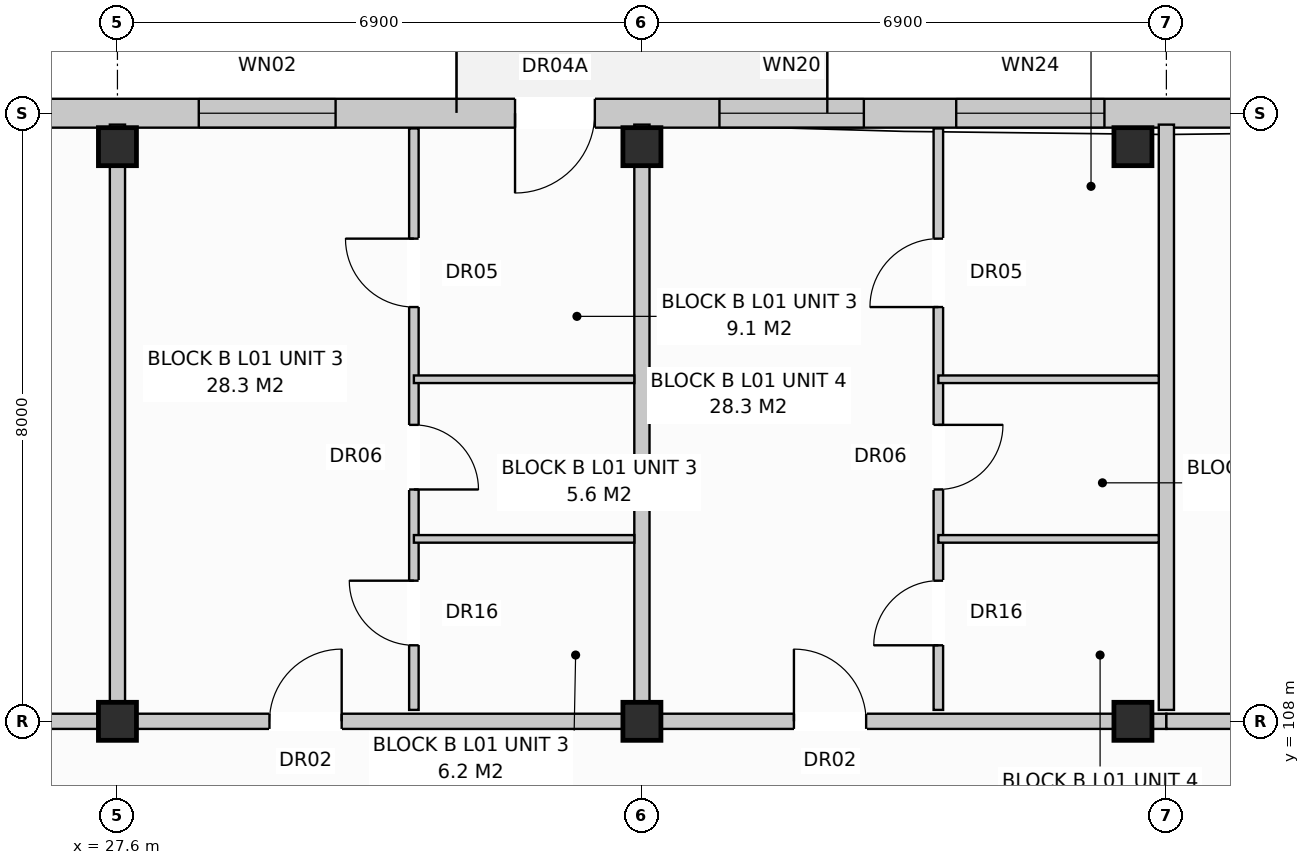
"""IFC4 building model, lengths in metres.
Left out: names, types, materials, properties, quantities, classifications, styles, units other than length and angle.
Written with IfcOpenShell. Run it as: python <this file> out.ifc"""

import sys

from ifc_helpers import new_model, si_unit, direction, frame, frame_2d, origin, origin_with_axes, origin_2d, place, context, subcontext, project, spatial, rectangle, extrude, element, fill, save


model = new_model("IFC4")
c1 = context("Model", 3, precision=1e-05, world=origin(), true_north=direction((0.0, 1.0)))
c2 = subcontext(c1, "Body", "Model", "MODEL_VIEW")
j1 = project(units=[si_unit("LENGTHUNIT", "METRE"), si_unit("PLANEANGLEUNIT", "RADIAN")], contexts=[c1])
p1 = place(None, origin())
s1 = spatial("IfcSite", under=j1, at=p1, CompositionType="ELEMENT")
p2 = place(p1, origin())
s2 = spatial("IfcBuilding", under=s1, at=p2, CompositionType="ELEMENT")
p3 = place(p2, frame((0.0, 0.0, 4.4)))
s3 = spatial("IfcBuildingStorey", under=s2, at=p3, CompositionType="ELEMENT", Elevation=4.4)
for number, where, z_axis, x_axis in (
    (1, (27.6, 108.0, 0.0), (0.0, 0.0, 1.0), (1.0, 0.0, 0.0)),
    (2, (27.6, 115.56, 0.0), (0.0, 0.0, 1.0), (1.0, 0.0, 0.0)),
    (3, (34.5, 108.0, 0.0), (0.0, 0.0, 1.0), (1.0, 0.0, 0.0)),
    (4, (34.5, 115.56, 0.0), (0.0, 0.0, 1.0), (1.0, 0.0, 0.0)),
    (5, (40.96, 108.0, 0.0), (0.0, 0.0, 1.0), (1.0, 0.0, 0.0)),
    (6, (40.96, 115.56, 0.0), (0.0, 0.0, 1.0), (1.0, 0.0, 0.0)),
):
    element("IfcColumn", number, at=place(p3, frame(where, z_axis=z_axis, x_axis=x_axis)), inside=s3, PredefinedType="COLUMN", context=c2, shape_type="SweptSolid", body=[
        extrude(rectangle(XDim=0.5, YDim=0.5, at=origin_2d()), origin(), (0.0, 0.0, 1.0), 3.6),
    ])
p4 = place(p3, frame((0.18, 116.0, 0.0), z_axis=(0.0, 0.0, 1.0), x_axis=(1.0, 0.0, 0.0)))
e7 = element("IfcWall", 7, at=p4, inside=s3, PredefinedType="STANDARD", context=c2, shape_type="SweptSolid", body=[
    extrude(rectangle(XDim=54.84, YDim=0.38, at=frame_2d((27.42, 0.0))), origin(), (0.0, 0.0, 1.0), 3.33),
])
p5 = place(p4, frame((7.34, 0.0, 0.0)))
e8 = element("IfcOpeningElement", 8, at=p5, cuts=e7, PredefinedType="OPENING", context=c2, shape_type="SweptSolid", body=[
    extrude(rectangle(XDim=1.05, YDim=2.12, at=frame_2d((0.525, 1.06))), frame((0.0, 0.202, 0.0), z_axis=(0.0, -1.0, 0.0), x_axis=(1.0, 0.0, 0.0)), (0.0, 0.0, 1.0), 0.404),
])
p6 = place(p4, frame((18.851, 0.0, 0.0)))
e9 = element("IfcOpeningElement", 9, at=p6, cuts=e7, PredefinedType="OPENING", context=c2, shape_type="SweptSolid", body=[
    extrude(rectangle(XDim=1.05, YDim=2.12, at=frame_2d((0.525, 1.06))), frame((0.0, 0.202, 0.0), z_axis=(0.0, -1.0, 0.0), x_axis=(1.0, 0.0, 0.0)), (0.0, 0.0, 1.0), 0.404),
])
p7 = place(p4, frame((32.651, 0.0, 0.0)))
e10 = element("IfcOpeningElement", 10, at=p7, cuts=e7, PredefinedType="OPENING", context=c2, shape_type="SweptSolid", body=[
    extrude(rectangle(XDim=1.05, YDim=2.12, at=frame_2d((0.525, 1.06))), frame((0.0, 0.202, 0.0), z_axis=(0.0, -1.0, 0.0), x_axis=(1.0, 0.0, 0.0)), (0.0, 0.0, 1.0), 0.404),
])
p8 = place(p4, frame((48.74, 0.0, 0.0)))
e11 = element("IfcOpeningElement", 11, at=p8, cuts=e7, PredefinedType="OPENING", context=c2, shape_type="SweptSolid", body=[
    extrude(rectangle(XDim=1.05, YDim=2.12, at=frame_2d((0.525, 1.06))), frame((0.0, 0.202, 0.0), z_axis=(0.0, -1.0, 0.0), x_axis=(1.0, 0.0, 0.0)), (0.0, 0.0, 1.0), 0.404),
])
p9 = place(p4, frame((1.54, 0.0, 0.8)))
e12 = element("IfcOpeningElement", 12, at=p9, cuts=e7, PredefinedType="OPENING", context=c2, shape_type="SweptSolid", body=[
    extrude(rectangle(XDim=1.9, YDim=1.85, at=frame_2d((0.95, 0.925))), frame((0.0, 0.202, 0.0), z_axis=(0.0, -1.0, 0.0), x_axis=(1.0, 0.0, 0.0)), (0.0, 0.0, 1.0), 0.404),
])
p10 = place(p4, frame((10.415, 0.0, 0.8)))
e13 = element("IfcOpeningElement", 13, at=p10, cuts=e7, PredefinedType="OPENING", context=c2, shape_type="SweptSolid", body=[
    extrude(rectangle(XDim=1.95, YDim=1.65, at=frame_2d((0.975, 0.825))), frame((0.0, 0.202, 0.0), z_axis=(0.0, -1.0, 0.0), x_axis=(1.0, 0.0, 0.0)), (0.0, 0.0, 1.0), 0.404),
])
p11 = place(p4, frame((14.89, 0.0, 0.8)))
e14 = element("IfcOpeningElement", 14, at=p11, cuts=e7, PredefinedType="OPENING", context=c2, shape_type="SweptSolid", body=[
    extrude(rectangle(XDim=1.8, YDim=1.7, at=frame_2d((0.9, 0.85))), frame((0.0, 0.202, 0.0), z_axis=(0.0, -1.0, 0.0), x_axis=(1.0, 0.0, 0.0)), (0.0, 0.0, 1.0), 0.404),
])
p12 = place(p4, frame((21.09, 0.0, 0.9)))
e15 = element("IfcOpeningElement", 15, at=p12, cuts=e7, PredefinedType="OPENING", context=c2, shape_type="SweptSolid", body=[
    extrude(rectangle(XDim=0.95, YDim=1.55, at=frame_2d((0.475, 0.775))), frame((0.0, 0.202, 0.0), z_axis=(0.0, -1.0, 0.0), x_axis=(1.0, 0.0, 0.0)), (0.0, 0.0, 1.0), 0.404),
])
p13 = place(p4, frame((23.815, 0.0, 0.8)))
e16 = element("IfcOpeningElement", 16, at=p13, cuts=e7, PredefinedType="OPENING", context=c2, shape_type="SweptSolid", body=[
    extrude(rectangle(XDim=1.95, YDim=1.65, at=frame_2d((0.975, 0.825))), frame((0.0, 0.202, 0.0), z_axis=(0.0, -1.0, 0.0), x_axis=(1.0, 0.0, 0.0)), (0.0, 0.0, 1.0), 0.404),
])
p14 = place(p4, frame((28.49, 0.0, 0.8)))
e17 = element("IfcOpeningElement", 17, at=p14, cuts=e7, PredefinedType="OPENING", context=c2, shape_type="SweptSolid", body=[
    extrude(rectangle(XDim=1.8, YDim=1.7, at=frame_2d((0.9, 0.85))), frame((0.0, 0.202, 0.0), z_axis=(0.0, -1.0, 0.0), x_axis=(1.0, 0.0, 0.0)), (0.0, 0.0, 1.0), 0.404),
])
p15 = place(p4, frame((35.34, 0.0, 0.8)))
e18 = element("IfcOpeningElement", 18, at=p15, cuts=e7, PredefinedType="OPENING", context=c2, shape_type="SweptSolid", body=[
    extrude(rectangle(XDim=1.9, YDim=1.85, at=frame_2d((0.95, 0.925))), frame((0.0, 0.202, 0.0), z_axis=(0.0, -1.0, 0.0), x_axis=(1.0, 0.0, 0.0)), (0.0, 0.0, 1.0), 0.404),
])
p16 = place(p4, frame((38.455, 0.0, 0.8)))
e19 = element("IfcOpeningElement", 19, at=p16, cuts=e7, PredefinedType="OPENING", context=c2, shape_type="SweptSolid", body=[
    extrude(rectangle(XDim=1.95, YDim=1.65, at=frame_2d((0.975, 0.825))), frame((0.0, 0.202, 0.0), z_axis=(0.0, -1.0, 0.0), x_axis=(1.0, 0.0, 0.0)), (0.0, 0.0, 1.0), 0.404),
])
p17 = place(p4, frame((42.99, 0.0, 0.8)))
e20 = element("IfcOpeningElement", 20, at=p17, cuts=e7, PredefinedType="OPENING", context=c2, shape_type="SweptSolid", body=[
    extrude(rectangle(XDim=1.8, YDim=1.7, at=frame_2d((0.9, 0.85))), frame((0.0, 0.202, 0.0), z_axis=(0.0, -1.0, 0.0), x_axis=(1.0, 0.0, 0.0)), (0.0, 0.0, 1.0), 0.404),
])
p18 = place(p4, frame((51.84, 0.0, 0.8)))
e21 = element("IfcOpeningElement", 21, at=p18, cuts=e7, PredefinedType="OPENING", context=c2, shape_type="SweptSolid", body=[
    extrude(rectangle(XDim=1.9, YDim=1.85, at=frame_2d((0.95, 0.925))), frame((0.0, 0.202, 0.0), z_axis=(0.0, -1.0, 0.0), x_axis=(1.0, 0.0, 0.0)), (0.0, 0.0, 1.0), 0.404),
])
p19 = place(p3, frame((27.6, 108.15, 0.0), z_axis=(0.0, 0.0, 1.0), x_axis=(0.0, 1.0, 0.0)))
e22 = element("IfcWall", 22, at=p19, inside=s3, PredefinedType="PARTITIONING", context=c2, shape_type="SweptSolid", body=[
    extrude(rectangle(XDim=7.7, YDim=0.2, at=frame_2d((3.85, 0.0))), origin(), (0.0, 0.0, 1.0), 3.33),
])
p20 = place(p3, frame((13.8, 108.0, 0.0), z_axis=(0.0, 0.0, 1.0), x_axis=(1.0, 0.0, 0.0)))
e23 = element("IfcWall", 23, at=p20, inside=s3, PredefinedType="PARTITIONING", context=c2, shape_type="SweptSolid", body=[
    extrude(rectangle(XDim=13.8, YDim=0.2, at=frame_2d((6.9, 0.0))), origin(), (0.0, 0.0, 1.0), 2.77),
])
p21 = place(p20, frame((9.6, 0.0, 0.0)))
e24 = element("IfcOpeningElement", 24, at=p21, cuts=e23, PredefinedType="OPENING", context=c2, shape_type="SweptSolid", body=[
    extrude(rectangle(XDim=0.95, YDim=2.15, at=frame_2d((0.475, 1.075))), frame((0.0, 0.112, 0.0), z_axis=(0.0, -1.0, 0.0), x_axis=(1.0, 0.0, 0.0)), (0.0, 0.0, 1.0), 0.224),
])
p22 = place(p3, frame((34.5, 108.15, 0.0), z_axis=(0.0, 0.0, 1.0), x_axis=(0.0, 1.0, 0.0)))
e25 = element("IfcWall", 25, at=p22, inside=s3, PredefinedType="PARTITIONING", context=c2, shape_type="SweptSolid", body=[
    extrude(rectangle(XDim=7.7, YDim=0.2, at=frame_2d((3.85, 0.0))), origin(), (0.0, 0.0, 1.0), 3.33),
])
p23 = place(p3, frame((27.6, 108.0, 0.0), z_axis=(0.0, 0.0, 1.0), x_axis=(1.0, 0.0, 0.0)))
e26 = element("IfcWall", 26, at=p23, inside=s3, PredefinedType="PARTITIONING", context=c2, shape_type="SweptSolid", body=[
    extrude(rectangle(XDim=6.9, YDim=0.2, at=frame_2d((3.45, 0.0))), origin(), (0.0, 0.0, 1.0), 2.77),
])
p24 = place(p23, frame((2.0, 0.0, 0.0)))
e27 = element("IfcOpeningElement", 27, at=p24, cuts=e26, PredefinedType="OPENING", context=c2, shape_type="SweptSolid", body=[
    extrude(rectangle(XDim=0.95, YDim=2.15, at=frame_2d((0.475, 1.075))), frame((0.0, 0.112, 0.0), z_axis=(0.0, -1.0, 0.0), x_axis=(1.0, 0.0, 0.0)), (0.0, 0.0, 1.0), 0.224),
])
p25 = place(p3, frame((31.5, 108.15, 0.0), z_axis=(0.0, 0.0, 1.0), x_axis=(0.0, 1.0, 0.0)))
e28 = element("IfcWall", 28, at=p25, inside=s3, PredefinedType="PARTITIONING", context=c2, shape_type="SweptSolid", body=[
    extrude(rectangle(XDim=7.65, YDim=0.125, at=frame_2d((3.825, 0.0))), origin(), (0.0, 0.0, 1.0), 3.33),
])
p26 = place(p25, frame((0.85, 0.0, 0.0)))
e29 = element("IfcOpeningElement", 29, at=p26, cuts=e28, PredefinedType="OPENING", context=c2, shape_type="SweptSolid", body=[
    extrude(rectangle(XDim=0.85, YDim=2.1, at=frame_2d((0.425, 1.05))), frame((0.0, 0.074, 0.0), z_axis=(0.0, -1.0, 0.0), x_axis=(1.0, 0.0, 0.0)), (0.0, 0.0, 1.0), 0.149),
])
p27 = place(p25, frame((2.9, 0.0, 0.0)))
e30 = element("IfcOpeningElement", 30, at=p27, cuts=e28, PredefinedType="OPENING", context=c2, shape_type="SweptSolid", body=[
    extrude(rectangle(XDim=0.85, YDim=2.05, at=frame_2d((0.425, 1.025))), frame((0.0, 0.074, 0.0), z_axis=(0.0, -1.0, 0.0), x_axis=(1.0, 0.0, 0.0)), (0.0, 0.0, 1.0), 0.149),
])
p28 = place(p25, frame((5.3, 0.0, 0.0)))
e31 = element("IfcOpeningElement", 31, at=p28, cuts=e28, PredefinedType="OPENING", context=c2, shape_type="SweptSolid", body=[
    extrude(rectangle(XDim=0.9, YDim=2.1, at=frame_2d((0.45, 1.05))), frame((0.0, 0.074, 0.0), z_axis=(0.0, -1.0, 0.0), x_axis=(1.0, 0.0, 0.0)), (0.0, 0.0, 1.0), 0.149),
])
for number, where, z_axis, x_axis in (
    (32, (31.5, 110.4, 0.0), (0.0, 0.0, 1.0), (1.0, 0.0, 0.0)),
    (33, (31.5, 112.5, 0.0), (0.0, 0.0, 1.0), (1.0, 0.0, 0.0)),
):
    element("IfcWall", number, at=place(p3, frame(where, z_axis=z_axis, x_axis=x_axis)), inside=s3, PredefinedType="PARTITIONING", context=c2, shape_type="SweptSolid", body=[
        extrude(rectangle(XDim=2.9, YDim=0.1, at=frame_2d((1.45, 0.0))), origin(), (0.0, 0.0, 1.0), 3.33),
    ])
p29 = place(p3, frame((41.4, 108.15, 0.0), z_axis=(0.0, 0.0, 1.0), x_axis=(0.0, 1.0, 0.0)))
e34 = element("IfcWall", 34, at=p29, inside=s3, PredefinedType="PARTITIONING", context=c2, shape_type="SweptSolid", body=[
    extrude(rectangle(XDim=7.7, YDim=0.2, at=frame_2d((3.85, 0.0))), origin(), (0.0, 0.0, 1.0), 3.33),
])
p30 = place(p3, frame((34.5, 108.0, 0.0), z_axis=(0.0, 0.0, 1.0), x_axis=(1.0, 0.0, 0.0)))
e35 = element("IfcWall", 35, at=p30, inside=s3, PredefinedType="PARTITIONING", context=c2, shape_type="SweptSolid", body=[
    extrude(rectangle(XDim=6.9, YDim=0.2, at=frame_2d((3.45, 0.0))), origin(), (0.0, 0.0, 1.0), 2.77),
])
p31 = place(p30, frame((2.0, 0.0, 0.0)))
e36 = element("IfcOpeningElement", 36, at=p31, cuts=e35, PredefinedType="OPENING", context=c2, shape_type="SweptSolid", body=[
    extrude(rectangle(XDim=0.95, YDim=2.15, at=frame_2d((0.475, 1.075))), frame((0.0, 0.112, 0.0), z_axis=(0.0, -1.0, 0.0), x_axis=(1.0, 0.0, 0.0)), (0.0, 0.0, 1.0), 0.224),
])
p32 = place(p3, frame((38.4, 108.15, 0.0), z_axis=(0.0, 0.0, 1.0), x_axis=(0.0, 1.0, 0.0)))
e37 = element("IfcWall", 37, at=p32, inside=s3, PredefinedType="PARTITIONING", context=c2, shape_type="SweptSolid", body=[
    extrude(rectangle(XDim=7.65, YDim=0.125, at=frame_2d((3.825, 0.0))), origin(), (0.0, 0.0, 1.0), 2.99),
])
p33 = place(p32, frame((0.85, 0.0, 0.0)))
e38 = element("IfcOpeningElement", 38, at=p33, cuts=e37, PredefinedType="OPENING", context=c2, shape_type="SweptSolid", body=[
    extrude(rectangle(XDim=0.85, YDim=2.1, at=frame_2d((0.425, 1.05))), frame((0.0, 0.074, 0.0), z_axis=(0.0, -1.0, 0.0), x_axis=(1.0, 0.0, 0.0)), (0.0, 0.0, 1.0), 0.149),
])
p34 = place(p32, frame((2.9, 0.0, 0.0)))
e39 = element("IfcOpeningElement", 39, at=p34, cuts=e37, PredefinedType="OPENING", context=c2, shape_type="SweptSolid", body=[
    extrude(rectangle(XDim=0.85, YDim=2.05, at=frame_2d((0.425, 1.025))), frame((0.0, 0.074, 0.0), z_axis=(0.0, -1.0, 0.0), x_axis=(1.0, 0.0, 0.0)), (0.0, 0.0, 1.0), 0.149),
])
p35 = place(p32, frame((5.3, 0.0, 0.0)))
e40 = element("IfcOpeningElement", 40, at=p35, cuts=e37, PredefinedType="OPENING", context=c2, shape_type="SweptSolid", body=[
    extrude(rectangle(XDim=0.9, YDim=2.1, at=frame_2d((0.45, 1.05))), frame((0.0, 0.074, 0.0), z_axis=(0.0, -1.0, 0.0), x_axis=(1.0, 0.0, 0.0)), (0.0, 0.0, 1.0), 0.149),
])
for number, where, z_axis, x_axis in (
    (41, (38.4, 110.4, 0.0), (0.0, 0.0, 1.0), (1.0, 0.0, 0.0)),
    (42, (38.4, 112.5, 0.0), (0.0, 0.0, 1.0), (1.0, 0.0, 0.0)),
):
    element("IfcWall", number, at=place(p3, frame(where, z_axis=z_axis, x_axis=x_axis)), inside=s3, PredefinedType="PARTITIONING", context=c2, shape_type="SweptSolid", body=[
        extrude(rectangle(XDim=2.9, YDim=0.1, at=frame_2d((1.45, 0.0))), origin(), (0.0, 0.0, 1.0), 3.33),
    ])
p36 = place(p3, frame((41.4, 108.0, 0.0), z_axis=(0.0, 0.0, 1.0), x_axis=(1.0, 0.0, 0.0)))
e43 = element("IfcWall", 43, at=p36, inside=s3, PredefinedType="PARTITIONING", context=c2, shape_type="SweptSolid", body=[
    extrude(rectangle(XDim=13.8, YDim=0.2, at=frame_2d((6.9, 0.0))), origin(), (0.0, 0.0, 1.0), 2.77),
])
p37 = place(p36, frame((2.4, 0.0, 0.0)))
e44 = element("IfcOpeningElement", 44, at=p37, cuts=e43, PredefinedType="OPENING", context=c2, shape_type="SweptSolid", body=[
    extrude(rectangle(XDim=0.95, YDim=2.15, at=frame_2d((0.475, 1.075))), frame((0.0, 0.112, 0.0), z_axis=(0.0, -1.0, 0.0), x_axis=(1.0, 0.0, 0.0)), (0.0, 0.0, 1.0), 0.224),
])
p38 = place(p7, frame((1.05, 0.0, 0.0), z_axis=(0.0, 0.0, 1.0), x_axis=(-1.0, 0.0, 0.0)))
e45 = element("IfcDoor", 45, at=p38, inside=s3, OperationType="SINGLE_SWING_LEFT", PredefinedType="DOOR", context=c2, shape_type="SweptSolid", body=[
    extrude(rectangle(XDim=1.05, YDim=2.12, at=frame_2d((0.525, 1.06))), frame((0.0, 0.025, 0.0), z_axis=(0.0, -1.0, 0.0), x_axis=(1.0, 0.0, 0.0)), (0.0, 0.0, 1.0), 0.05),
])
fill(e10, e45)
p39 = place(p14, origin_with_axes())
e46 = element("IfcWindow", 46, at=p39, inside=s3, PartitioningType="SINGLE_PANEL", PredefinedType="WINDOW", context=c2, shape_type="SweptSolid", body=[
    extrude(rectangle(XDim=1.8, YDim=1.7, at=frame_2d((0.9, 0.85))), frame((0.0, 0.03, 0.0), z_axis=(0.0, -1.0, 0.0), x_axis=(1.0, 0.0, 0.0)), (0.0, 0.0, 1.0), 0.06),
])
fill(e17, e46)
p40 = place(p15, origin_with_axes())
e47 = element("IfcWindow", 47, at=p40, inside=s3, PartitioningType="SINGLE_PANEL", PredefinedType="WINDOW", context=c2, shape_type="SweptSolid", body=[
    extrude(rectangle(XDim=1.9, YDim=1.85, at=frame_2d((0.95, 0.925))), frame((0.0, 0.03, 0.0), z_axis=(0.0, -1.0, 0.0), x_axis=(1.0, 0.0, 0.0)), (0.0, 0.0, 1.0), 0.06),
])
fill(e18, e47)
p41 = place(p16, origin_with_axes())
e48 = element("IfcWindow", 48, at=p41, inside=s3, PartitioningType="SINGLE_PANEL", PredefinedType="WINDOW", context=c2, shape_type="SweptSolid", body=[
    extrude(rectangle(XDim=1.95, YDim=1.65, at=frame_2d((0.975, 0.825))), frame((0.0, 0.03, 0.0), z_axis=(0.0, -1.0, 0.0), x_axis=(1.0, 0.0, 0.0)), (0.0, 0.0, 1.0), 0.06),
])
fill(e19, e48)
p42 = place(p24, origin_with_axes())
e49 = element("IfcDoor", 49, at=p42, inside=s3, OperationType="SINGLE_SWING_RIGHT", PredefinedType="DOOR", context=c2, shape_type="SweptSolid", body=[
    extrude(rectangle(XDim=0.95, YDim=2.15, at=frame_2d((0.475, 1.075))), frame((0.0, 0.025, 0.0), z_axis=(0.0, -1.0, 0.0), x_axis=(1.0, 0.0, 0.0)), (0.0, 0.0, 1.0), 0.05),
])
fill(e27, e49)
p43 = place(p26, origin_with_axes())
e50 = element("IfcDoor", 50, at=p43, inside=s3, OperationType="SINGLE_SWING_RIGHT", PredefinedType="DOOR", context=c2, shape_type="SweptSolid", body=[
    extrude(rectangle(XDim=0.85, YDim=2.1, at=frame_2d((0.425, 1.05))), frame((0.0, 0.025, 0.0), z_axis=(0.0, -1.0, 0.0), x_axis=(1.0, 0.0, 0.0)), (0.0, 0.0, 1.0), 0.05),
])
fill(e29, e50)
p44 = place(p27, frame((0.85, 0.0, 0.0), z_axis=(0.0, 0.0, 1.0), x_axis=(-1.0, 0.0, 0.0)))
e51 = element("IfcDoor", 51, at=p44, inside=s3, OperationType="SINGLE_SWING_LEFT", PredefinedType="DOOR", context=c2, shape_type="SweptSolid", body=[
    extrude(rectangle(XDim=0.85, YDim=2.05, at=frame_2d((0.425, 1.025))), frame((0.0, 0.025, 0.0), z_axis=(0.0, -1.0, 0.0), x_axis=(1.0, 0.0, 0.0)), (0.0, 0.0, 1.0), 0.05),
])
fill(e30, e51)
p45 = place(p28, origin_with_axes())
e52 = element("IfcDoor", 52, at=p45, inside=s3, OperationType="SINGLE_SWING_RIGHT", PredefinedType="DOOR", context=c2, shape_type="SweptSolid", body=[
    extrude(rectangle(XDim=0.9, YDim=2.1, at=frame_2d((0.45, 1.05))), frame((0.0, 0.025, 0.0), z_axis=(0.0, -1.0, 0.0), x_axis=(1.0, 0.0, 0.0)), (0.0, 0.0, 1.0), 0.05),
])
fill(e31, e52)
p46 = place(p31, origin_with_axes())
e53 = element("IfcDoor", 53, at=p46, inside=s3, OperationType="SINGLE_SWING_LEFT", PredefinedType="DOOR", context=c2, shape_type="SweptSolid", body=[
    extrude(rectangle(XDim=0.95, YDim=2.15, at=frame_2d((0.475, 1.075))), frame((0.0, 0.025, 0.0), z_axis=(0.0, -1.0, 0.0), x_axis=(1.0, 0.0, 0.0)), (0.0, 0.0, 1.0), 0.05),
])
fill(e36, e53)
p47 = place(p33, origin_with_axes())
e54 = element("IfcDoor", 54, at=p47, inside=s3, OperationType="SINGLE_SWING_LEFT", PredefinedType="DOOR", context=c2, shape_type="SweptSolid", body=[
    extrude(rectangle(XDim=0.85, YDim=2.1, at=frame_2d((0.425, 1.05))), frame((0.0, 0.025, 0.0), z_axis=(0.0, -1.0, 0.0), x_axis=(1.0, 0.0, 0.0)), (0.0, 0.0, 1.0), 0.05),
])
fill(e38, e54)
p48 = place(p34, frame((0.85, 0.0, 0.0), z_axis=(0.0, 0.0, 1.0), x_axis=(-1.0, 0.0, 0.0)))
e55 = element("IfcDoor", 55, at=p48, inside=s3, OperationType="SINGLE_SWING_RIGHT", PredefinedType="DOOR", context=c2, shape_type="SweptSolid", body=[
    extrude(rectangle(XDim=0.85, YDim=2.05, at=frame_2d((0.425, 1.025))), frame((0.0, 0.025, 0.0), z_axis=(0.0, -1.0, 0.0), x_axis=(1.0, 0.0, 0.0)), (0.0, 0.0, 1.0), 0.05),
])
fill(e39, e55)
p49 = place(p35, origin_with_axes())
e56 = element("IfcDoor", 56, at=p49, inside=s3, OperationType="SINGLE_SWING_LEFT", PredefinedType="DOOR", context=c2, shape_type="SweptSolid", body=[
    extrude(rectangle(XDim=0.9, YDim=2.1, at=frame_2d((0.45, 1.05))), frame((0.0, 0.025, 0.0), z_axis=(0.0, -1.0, 0.0), x_axis=(1.0, 0.0, 0.0)), (0.0, 0.0, 1.0), 0.05),
])
fill(e40, e56)
save(model, sys.argv[1])
